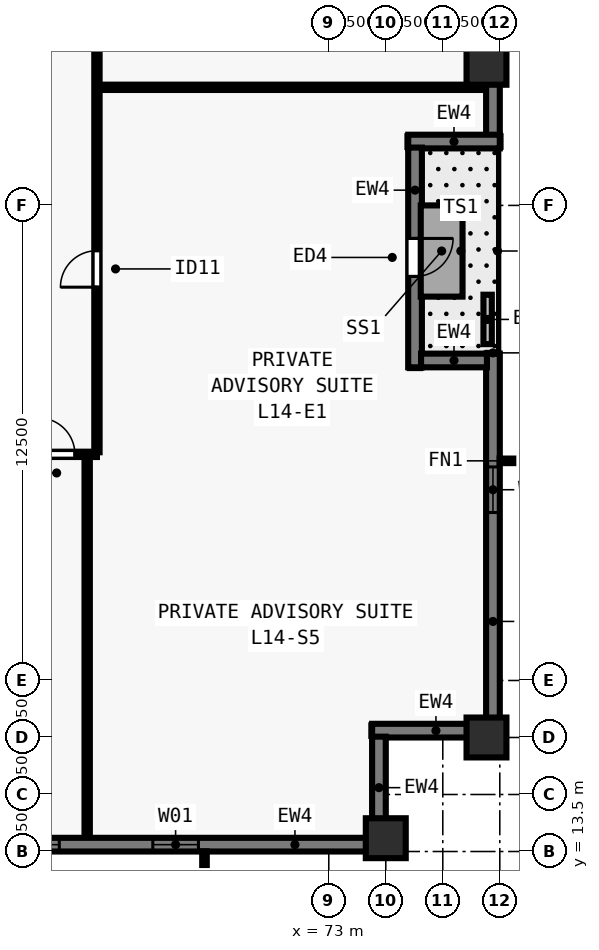
"""IFC4 building model, lengths in metres.
Left out: names, types, materials, properties, quantities, classifications, styles, units other than length and angle.
Written with IfcOpenShell. Run it as: python <this file> out.ifc"""

import sys

from ifc_helpers import new_model, si_unit, direction, frame, frame_2d, origin, origin_2d, place, context, subcontext, project, spatial, rectangle, extrude, element, fill, save


model = new_model("IFC4")
c1 = context("Model", 3, precision=1e-05, world=origin(), true_north=direction((0.0, 1.0)))
c2 = subcontext(c1, "Body", "Model", "MODEL_VIEW")
j1 = project(units=[si_unit("LENGTHUNIT", "METRE"), si_unit("PLANEANGLEUNIT", "RADIAN")], contexts=[c1])
p1 = place(None, origin())
s1 = spatial("IfcSite", under=j1, at=p1, CompositionType="ELEMENT")
p2 = place(p1, origin())
s2 = spatial("IfcBuilding", under=s1, at=p2, CompositionType="ELEMENT")
p3 = place(p2, frame((0.0, 0.0, 55.0)))
s3 = spatial("IfcBuildingStorey", under=s2, at=p3, CompositionType="ELEMENT", Elevation=55.0)
for number, where, z_axis, x_axis in (
    (1, (74.5, 13.85, 0.0), (0.0, 0.0, 1.0), (1.0, 0.0, 0.0)),
    (2, (77.15, 16.5, 0.0), (0.0, 0.0, 1.0), (0.0, 1.0, 0.0)),
    (3, (77.15, 34.2, 0.0), (0.0, 0.0, 1.0), (0.0, 1.0, 0.0)),
):
    element("IfcColumn", number, at=place(p3, frame(where, z_axis=z_axis, x_axis=x_axis)), inside=s3, PredefinedType="COLUMN", context=c2, shape_type="SweptSolid", body=[
        extrude(rectangle(XDim=1.05, YDim=1.05, at=origin_2d()), origin(), (0.0, 0.0, 1.0), 3.5),
    ])
p4 = place(p3, frame((77.32, 26.6, 0.0), z_axis=(0.0, 0.0, 1.0), x_axis=(0.0, -1.0, 0.0)))
e4 = element("IfcWall", 4, at=p4, inside=s3, PredefinedType="SOLIDWALL", context=c2, shape_type="SweptSolid", body=[
    extrude(rectangle(XDim=9.762, YDim=0.36, at=frame_2d((4.881, 0.0))), origin(), (0.0, 0.0, 1.0), 3.28),
])
p5 = place(p4, frame((2.981, 0.0, 0.8)))
e5 = element("IfcOpeningElement", 5, at=p5, cuts=e4, PredefinedType="OPENING", context=c2, shape_type="SweptSolid", body=[
    extrude(rectangle(XDim=1.2, YDim=1.544, at=frame_2d((0.6, 0.772))), frame((0.0, 0.19, 0.0), z_axis=(0.0, -1.0, 0.0), x_axis=(1.0, 0.0, 0.0)), (0.0, 0.0, 1.0), 0.38),
])
p6 = place(p3, frame((77.5, 16.68, 0.0), z_axis=(0.0, 0.0, 1.0), x_axis=(-1.0, 0.0, 0.0)))
e6 = element("IfcWall", 6, at=p6, inside=s3, PredefinedType="SOLIDWALL", context=c2, shape_type="SweptSolid", body=[
    extrude(rectangle(XDim=3.36, YDim=0.36, at=frame_2d((1.68, 0.0))), origin(), (0.0, 0.0, 1.0), 3.28),
])
p7 = place(p3, frame((74.32, 16.522, 0.0), z_axis=(0.0, 0.0, 1.0), x_axis=(0.0, -1.0, 0.0)))
e7 = element("IfcWall", 7, at=p7, inside=s3, PredefinedType="SOLIDWALL", context=c2, shape_type="SweptSolid", body=[
    extrude(rectangle(XDim=2.684, YDim=0.36, at=frame_2d((1.342, 0.0))), origin(), (0.0, 0.0, 1.0), 3.28),
])
p8 = place(p3, frame((74.5, 13.68, 0.0), z_axis=(0.0, 0.0, 1.0), x_axis=(-1.0, 0.0, 0.0)))
e8 = element("IfcWall", 8, at=p8, inside=s3, PredefinedType="SOLIDWALL", context=c2, shape_type="SweptSolid", body=[
    extrude(rectangle(XDim=44.662, YDim=0.36, at=frame_2d((22.331, 0.0))), origin(), (0.0, 0.0, 1.0), 3.28),
])
p9 = place(p8, frame((4.93, 0.0, 0.8)))
e9 = element("IfcOpeningElement", 9, at=p9, cuts=e8, PredefinedType="OPENING", context=c2, shape_type="SweptSolid", body=[
    extrude(rectangle(XDim=1.2, YDim=1.544, at=frame_2d((0.6, 0.772))), frame((0.0, 0.19, 0.0), z_axis=(0.0, -1.0, 0.0), x_axis=(1.0, 0.0, 0.0)), (0.0, 0.0, 1.0), 0.38),
])
p10 = place(p8, frame((8.59, 0.0, 0.8)))
e10 = element("IfcOpeningElement", 10, at=p10, cuts=e8, PredefinedType="OPENING", context=c2, shape_type="SweptSolid", body=[
    extrude(rectangle(XDim=1.5, YDim=1.544, at=frame_2d((0.75, 0.772))), frame((0.0, 0.19, 0.0), z_axis=(0.0, -1.0, 0.0), x_axis=(1.0, 0.0, 0.0)), (0.0, 0.0, 1.0), 0.38),
])
p11 = place(p8, frame((11.65, 0.0, 0.8)))
e11 = element("IfcOpeningElement", 11, at=p11, cuts=e8, PredefinedType="OPENING", context=c2, shape_type="SweptSolid", body=[
    extrude(rectangle(XDim=1.2, YDim=1.544, at=frame_2d((0.6, 0.772))), frame((0.0, 0.19, 0.0), z_axis=(0.0, -1.0, 0.0), x_axis=(1.0, 0.0, 0.0)), (0.0, 0.0, 1.0), 0.38),
])
p12 = place(p8, frame((14.861, 0.0, 0.8)))
e12 = element("IfcOpeningElement", 12, at=p12, cuts=e8, PredefinedType="OPENING", context=c2, shape_type="SweptSolid", body=[
    extrude(rectangle(XDim=1.5, YDim=1.544, at=frame_2d((0.75, 0.772))), frame((0.0, 0.19, 0.0), z_axis=(0.0, -1.0, 0.0), x_axis=(1.0, 0.0, 0.0)), (0.0, 0.0, 1.0), 0.38),
])
p13 = place(p8, frame((18.821, 0.0, 0.8)))
e13 = element("IfcOpeningElement", 13, at=p13, cuts=e8, PredefinedType="OPENING", context=c2, shape_type="SweptSolid", body=[
    extrude(rectangle(XDim=1.2, YDim=1.544, at=frame_2d((0.6, 0.772))), frame((0.0, 0.19, 0.0), z_axis=(0.0, -1.0, 0.0), x_axis=(1.0, 0.0, 0.0)), (0.0, 0.0, 1.0), 0.38),
])
p14 = place(p8, frame((21.581, 0.0, 0.8)))
e14 = element("IfcOpeningElement", 14, at=p14, cuts=e8, PredefinedType="OPENING", context=c2, shape_type="SweptSolid", body=[
    extrude(rectangle(XDim=1.5, YDim=1.544, at=frame_2d((0.75, 0.772))), frame((0.0, 0.19, 0.0), z_axis=(0.0, -1.0, 0.0), x_axis=(1.0, 0.0, 0.0)), (0.0, 0.0, 1.0), 0.38),
])
p15 = place(p8, frame((25.091, 0.0, 0.8)))
e15 = element("IfcOpeningElement", 15, at=p15, cuts=e8, PredefinedType="OPENING", context=c2, shape_type="SweptSolid", body=[
    extrude(rectangle(XDim=1.2, YDim=1.544, at=frame_2d((0.6, 0.772))), frame((0.0, 0.19, 0.0), z_axis=(0.0, -1.0, 0.0), x_axis=(1.0, 0.0, 0.0)), (0.0, 0.0, 1.0), 0.38),
])
p16 = place(p8, frame((28.302, 0.0, 0.8)))
e16 = element("IfcOpeningElement", 16, at=p16, cuts=e8, PredefinedType="OPENING", context=c2, shape_type="SweptSolid", body=[
    extrude(rectangle(XDim=1.5, YDim=1.544, at=frame_2d((0.75, 0.772))), frame((0.0, 0.19, 0.0), z_axis=(0.0, -1.0, 0.0), x_axis=(1.0, 0.0, 0.0)), (0.0, 0.0, 1.0), 0.38),
])
p17 = place(p8, frame((31.812, 0.0, 0.8)))
e17 = element("IfcOpeningElement", 17, at=p17, cuts=e8, PredefinedType="OPENING", context=c2, shape_type="SweptSolid", body=[
    extrude(rectangle(XDim=1.2, YDim=1.544, at=frame_2d((0.6, 0.772))), frame((0.0, 0.19, 0.0), z_axis=(0.0, -1.0, 0.0), x_axis=(1.0, 0.0, 0.0)), (0.0, 0.0, 1.0), 0.38),
])
p18 = place(p8, frame((35.022, 0.0, 0.8)))
e18 = element("IfcOpeningElement", 18, at=p18, cuts=e8, PredefinedType="OPENING", context=c2, shape_type="SweptSolid", body=[
    extrude(rectangle(XDim=1.5, YDim=1.544, at=frame_2d((0.75, 0.772))), frame((0.0, 0.19, 0.0), z_axis=(0.0, -1.0, 0.0), x_axis=(1.0, 0.0, 0.0)), (0.0, 0.0, 1.0), 0.38),
])
p19 = place(p8, frame((38.532, 0.0, 0.8)))
e19 = element("IfcOpeningElement", 19, at=p19, cuts=e8, PredefinedType="OPENING", context=c2, shape_type="SweptSolid", body=[
    extrude(rectangle(XDim=1.2, YDim=1.544, at=frame_2d((0.6, 0.772))), frame((0.0, 0.19, 0.0), z_axis=(0.0, -1.0, 0.0), x_axis=(1.0, 0.0, 0.0)), (0.0, 0.0, 1.0), 0.38),
])
p20 = place(p3, frame((77.32, 61.5, 0.0), z_axis=(0.0, 0.0, 1.0), x_axis=(0.0, -1.0, 0.0)))
e20 = element("IfcWall", 20, at=p20, inside=s3, PredefinedType="SOLIDWALL", context=c2, shape_type="SweptSolid", body=[
    extrude(rectangle(XDim=29.162, YDim=0.36, at=frame_2d((14.581, 0.0))), origin(), (0.0, 0.0, 1.0), 3.28),
])
p21 = place(p20, frame((5.039, 0.0, 0.8)))
e21 = element("IfcOpeningElement", 21, at=p21, cuts=e20, PredefinedType="OPENING", context=c2, shape_type="SweptSolid", body=[
    extrude(rectangle(XDim=1.2, YDim=1.544, at=frame_2d((0.6, 0.772))), frame((0.0, 0.19, 0.0), z_axis=(0.0, -1.0, 0.0), x_axis=(1.0, 0.0, 0.0)), (0.0, 0.0, 1.0), 0.38),
])
p22 = place(p20, frame((8.466, 0.0, 0.8)))
e22 = element("IfcOpeningElement", 22, at=p22, cuts=e20, PredefinedType="OPENING", context=c2, shape_type="SweptSolid", body=[
    extrude(rectangle(XDim=1.5, YDim=1.544, at=frame_2d((0.75, 0.772))), frame((0.0, 0.19, 0.0), z_axis=(0.0, -1.0, 0.0), x_axis=(1.0, 0.0, 0.0)), (0.0, 0.0, 1.0), 0.38),
])
p23 = place(p20, frame((12.192, 0.0, 0.8)))
e23 = element("IfcOpeningElement", 23, at=p23, cuts=e20, PredefinedType="OPENING", context=c2, shape_type="SweptSolid", body=[
    extrude(rectangle(XDim=1.2, YDim=1.544, at=frame_2d((0.6, 0.772))), frame((0.0, 0.19, 0.0), z_axis=(0.0, -1.0, 0.0), x_axis=(1.0, 0.0, 0.0)), (0.0, 0.0, 1.0), 0.38),
])
p24 = place(p20, frame((15.169, 0.0, 0.8)))
e24 = element("IfcOpeningElement", 24, at=p24, cuts=e20, PredefinedType="OPENING", context=c2, shape_type="SweptSolid", body=[
    extrude(rectangle(XDim=1.5, YDim=1.544, at=frame_2d((0.75, 0.772))), frame((0.0, 0.19, 0.0), z_axis=(0.0, -1.0, 0.0), x_axis=(1.0, 0.0, 0.0)), (0.0, 0.0, 1.0), 0.38),
])
p25 = place(p20, frame((19.346, 0.0, 0.8)))
e25 = element("IfcOpeningElement", 25, at=p25, cuts=e20, PredefinedType="OPENING", context=c2, shape_type="SweptSolid", body=[
    extrude(rectangle(XDim=1.2, YDim=1.544, at=frame_2d((0.6, 0.772))), frame((0.0, 0.19, 0.0), z_axis=(0.0, -1.0, 0.0), x_axis=(1.0, 0.0, 0.0)), (0.0, 0.0, 1.0), 0.38),
])
p26 = place(p20, frame((22.773, 0.0, 0.8)))
e26 = element("IfcOpeningElement", 26, at=p26, cuts=e20, PredefinedType="OPENING", context=c2, shape_type="SweptSolid", body=[
    extrude(rectangle(XDim=1.5, YDim=1.544, at=frame_2d((0.75, 0.772))), frame((0.0, 0.19, 0.0), z_axis=(0.0, -1.0, 0.0), x_axis=(1.0, 0.0, 0.0)), (0.0, 0.0, 1.0), 0.38),
])
p27 = place(p3, frame((77.5, 32.18, 0.0), z_axis=(0.0, 0.0, 1.0), x_axis=(-1.0, 0.0, 0.0)))
e27 = element("IfcWall", 27, at=p27, inside=s3, PredefinedType="SOLIDWALL", context=c2, shape_type="SweptSolid", body=[
    extrude(rectangle(XDim=2.41, YDim=0.36, at=frame_2d((1.205, 0.0))), origin(), (0.0, 0.0, 1.0), 3.28),
])
p28 = place(p3, frame((75.27, 32.022, 0.0), z_axis=(0.0, 0.0, 1.0), x_axis=(0.0, -1.0, 0.0)))
e28 = element("IfcWall", 28, at=p28, inside=s3, PredefinedType="SOLIDWALL", context=c2, shape_type="SweptSolid", body=[
    extrude(rectangle(XDim=5.782, YDim=0.36, at=frame_2d((2.891, 0.0))), origin(), (0.0, 0.0, 1.0), 3.28),
])
p29 = place(p28, frame((2.391, 0.0, 0.0)))
e29 = element("IfcOpeningElement", 29, at=p29, cuts=e28, PredefinedType="OPENING", context=c2, shape_type="SweptSolid", body=[
    extrude(rectangle(XDim=1.0, YDim=2.15, at=frame_2d((0.5, 1.075))), frame((0.0, 0.19, 0.0), z_axis=(0.0, -1.0, 0.0), x_axis=(1.0, 0.0, 0.0)), (0.0, 0.0, 1.0), 0.38),
])
p30 = place(p3, frame((75.428, 26.42, 0.0), z_axis=(0.0, 0.0, 1.0), x_axis=(1.0, 0.0, 0.0)))
e30 = element("IfcWall", 30, at=p30, inside=s3, PredefinedType="SOLIDWALL", context=c2, shape_type="SweptSolid", body=[
    extrude(rectangle(XDim=1.734, YDim=0.36, at=frame_2d((0.867, 0.0))), origin(), (0.0, 0.0, 1.0), 3.28),
])
p31 = place(p3, frame((77.18, 26.85, 0.0), z_axis=(0.0, 0.0, 1.0), x_axis=(0.0, 1.0, 0.0)))
e31 = element("IfcWall", 31, at=p31, inside=s3, PredefinedType="PARAPET", context=c2, shape_type="SweptSolid", body=[
    extrude(rectangle(XDim=1.3, YDim=0.22, at=frame_2d((0.65, 0.0))), origin(), (0.0, 0.0, 1.0), 0.55),
])
p32 = place(p3, frame((37.1, 23.95, 0.0), z_axis=(0.0, 0.0, 1.0), x_axis=(1.0, 0.0, 0.0)))
e32 = element("IfcWall", 32, at=p32, inside=s3, PredefinedType="PARTITIONING", context=c2, shape_type="SweptSolid", body=[
    extrude(rectangle(XDim=29.8, YDim=0.14, at=frame_2d((14.9, 0.0))), origin(), (0.0, 0.0, 1.0), 3.28),
])
p33 = place(p32, frame((4.191, 0.0, 0.0)))
e33 = element("IfcOpeningElement", 33, at=p33, cuts=e32, PredefinedType="OPENING", context=c2, shape_type="SweptSolid", body=[
    extrude(rectangle(XDim=0.96, YDim=2.12, at=frame_2d((0.48, 1.06))), frame((0.0, 0.08, 0.0), z_axis=(0.0, -1.0, 0.0), x_axis=(1.0, 0.0, 0.0)), (0.0, 0.0, 1.0), 0.16),
])
p34 = place(p32, frame((5.358, 0.0, 0.0)))
e34 = element("IfcOpeningElement", 34, at=p34, cuts=e32, PredefinedType="OPENING", context=c2, shape_type="SweptSolid", body=[
    extrude(rectangle(XDim=0.96, YDim=2.12, at=frame_2d((0.48, 1.06))), frame((0.0, 0.08, 0.0), z_axis=(0.0, -1.0, 0.0), x_axis=(1.0, 0.0, 0.0)), (0.0, 0.0, 1.0), 0.16),
])
p35 = place(p32, frame((14.51, 0.0, 0.0)))
e35 = element("IfcOpeningElement", 35, at=p35, cuts=e32, PredefinedType="OPENING", context=c2, shape_type="SweptSolid", body=[
    extrude(rectangle(XDim=0.96, YDim=2.12, at=frame_2d((0.48, 1.06))), frame((0.0, 0.08, 0.0), z_axis=(0.0, -1.0, 0.0), x_axis=(1.0, 0.0, 0.0)), (0.0, 0.0, 1.0), 0.16),
])
p36 = place(p32, frame((24.542, 0.0, 0.0)))
e36 = element("IfcOpeningElement", 36, at=p36, cuts=e32, PredefinedType="OPENING", context=c2, shape_type="SweptSolid", body=[
    extrude(rectangle(XDim=0.96, YDim=2.12, at=frame_2d((0.48, 1.06))), frame((0.0, 0.08, 0.0), z_axis=(0.0, -1.0, 0.0), x_axis=(1.0, 0.0, 0.0)), (0.0, 0.0, 1.0), 0.16),
])
p37 = place(p32, frame((28.26, 0.0, 0.0)))
e37 = element("IfcOpeningElement", 37, at=p37, cuts=e32, PredefinedType="OPENING", context=c2, shape_type="SweptSolid", body=[
    extrude(rectangle(XDim=0.96, YDim=2.12, at=frame_2d((0.48, 1.06))), frame((0.0, 0.08, 0.0), z_axis=(0.0, -1.0, 0.0), x_axis=(1.0, 0.0, 0.0)), (0.0, 0.0, 1.0), 0.16),
])
p38 = place(p3, frame((66.9, 24.005, 0.0), z_axis=(0.0, 0.0, 1.0), x_axis=(0.0, 1.0, 0.0)))
e38 = element("IfcWall", 38, at=p38, inside=s3, PredefinedType="PARTITIONING", context=c2, shape_type="SweptSolid", body=[
    extrude(rectangle(XDim=29.99, YDim=0.14, at=frame_2d((14.995, 0.0))), origin(), (0.0, 0.0, 1.0), 3.28),
])
p39 = place(p38, frame((4.344, 0.0, 0.0)))
e39 = element("IfcOpeningElement", 39, at=p39, cuts=e38, PredefinedType="OPENING", context=c2, shape_type="SweptSolid", body=[
    extrude(rectangle(XDim=0.96, YDim=2.12, at=frame_2d((0.48, 1.06))), frame((0.0, 0.08, 0.0), z_axis=(0.0, -1.0, 0.0), x_axis=(1.0, 0.0, 0.0)), (0.0, 0.0, 1.0), 0.16),
])
p40 = place(p38, frame((14.452, 0.0, 0.0)))
e40 = element("IfcOpeningElement", 40, at=p40, cuts=e38, PredefinedType="OPENING", context=c2, shape_type="SweptSolid", body=[
    extrude(rectangle(XDim=0.96, YDim=2.12, at=frame_2d((0.48, 1.06))), frame((0.0, 0.08, 0.0), z_axis=(0.0, -1.0, 0.0), x_axis=(1.0, 0.0, 0.0)), (0.0, 0.0, 1.0), 0.16),
])
p41 = place(p38, frame((24.623, 0.0, 0.0)))
e41 = element("IfcOpeningElement", 41, at=p41, cuts=e38, PredefinedType="OPENING", context=c2, shape_type="SweptSolid", body=[
    extrude(rectangle(XDim=0.96, YDim=2.12, at=frame_2d((0.48, 1.06))), frame((0.0, 0.08, 0.0), z_axis=(0.0, -1.0, 0.0), x_axis=(1.0, 0.0, 0.0)), (0.0, 0.0, 1.0), 0.16),
])
p42 = place(p3, frame((66.643, 13.92, 0.0), z_axis=(0.0, 0.0, 1.0), x_axis=(0.0, 1.0, 0.0)))
e42 = element("IfcWall", 42, at=p42, inside=s3, PredefinedType="PARTITIONING", context=c2, shape_type="SweptSolid", body=[
    extrude(rectangle(XDim=9.93, YDim=0.14, at=frame_2d((4.965, 0.0))), origin(), (0.0, 0.0, 1.0), 2.439),
])
p43 = place(p3, frame((67.0, 33.607, 0.0), z_axis=(0.0, 0.0, 1.0), x_axis=(1.0, 0.0, 0.0)))
e43 = element("IfcWall", 43, at=p43, inside=s3, PredefinedType="PARTITIONING", context=c2, shape_type="SweptSolid", body=[
    extrude(rectangle(XDim=10.08, YDim=0.14, at=frame_2d((5.04, 0.0))), origin(), (0.0, 0.0, 1.0), 2.439),
])
p44 = place(p5, origin())
e44 = element("IfcWindow", 44, at=p44, inside=s3, PartitioningType="SINGLE_PANEL", PredefinedType="WINDOW", context=c2, shape_type="SweptSolid", body=[
    extrude(rectangle(XDim=1.2, YDim=1.544, at=frame_2d((0.6, 0.772))), frame((0.0, -0.05, 0.0), z_axis=(0.0, -1.0, 0.0), x_axis=(1.0, 0.0, 0.0)), (0.0, 0.0, 1.0), 0.06),
])
fill(e5, e44)
p45 = place(p9, origin())
e45 = element("IfcWindow", 45, at=p45, inside=s3, PartitioningType="SINGLE_PANEL", PredefinedType="WINDOW", context=c2, shape_type="SweptSolid", body=[
    extrude(rectangle(XDim=1.2, YDim=1.544, at=frame_2d((0.6, 0.772))), frame((0.0, -0.05, 0.0), z_axis=(0.0, -1.0, 0.0), x_axis=(1.0, 0.0, 0.0)), (0.0, 0.0, 1.0), 0.06),
])
fill(e9, e45)
p46 = place(p10, origin())
e46 = element("IfcWindow", 46, at=p46, inside=s3, PartitioningType="SINGLE_PANEL", PredefinedType="WINDOW", context=c2, shape_type="SweptSolid", body=[
    extrude(rectangle(XDim=1.5, YDim=1.544, at=frame_2d((0.75, 0.772))), frame((0.0, -0.05, 0.0), z_axis=(0.0, -1.0, 0.0), x_axis=(1.0, 0.0, 0.0)), (0.0, 0.0, 1.0), 0.06),
])
fill(e10, e46)
p47 = place(p29, origin())
e47 = element("IfcDoor", 47, at=p47, inside=s3, OperationType="SINGLE_SWING_LEFT", PredefinedType="DOOR", context=c2, shape_type="SweptSolid", body=[
    extrude(rectangle(XDim=1.0, YDim=2.15, at=frame_2d((0.5, 1.075))), frame((0.0, 0.025, 0.0), z_axis=(0.0, -1.0, 0.0), x_axis=(1.0, 0.0, 0.0)), (0.0, 0.0, 1.0), 0.05),
])
fill(e29, e47)
p48 = place(p37, origin())
e48 = element("IfcDoor", 48, at=p48, inside=s3, OperationType="SINGLE_SWING_LEFT", PredefinedType="DOOR", context=c2, shape_type="SweptSolid", body=[
    extrude(rectangle(XDim=0.96, YDim=2.12, at=frame_2d((0.48, 1.06))), frame((0.0, 0.025, 0.0), z_axis=(0.0, -1.0, 0.0), x_axis=(1.0, 0.0, 0.0)), (0.0, 0.0, 1.0), 0.05),
])
fill(e37, e48)
p49 = place(p39, origin())
e49 = element("IfcDoor", 49, at=p49, inside=s3, OperationType="SINGLE_SWING_LEFT", PredefinedType="DOOR", context=c2, shape_type="SweptSolid", body=[
    extrude(rectangle(XDim=0.96, YDim=2.12, at=frame_2d((0.48, 1.06))), frame((0.0, 0.025, 0.0), z_axis=(0.0, -1.0, 0.0), x_axis=(1.0, 0.0, 0.0)), (0.0, 0.0, 1.0), 0.05),
])
fill(e39, e49)
save(model, sys.argv[1])
